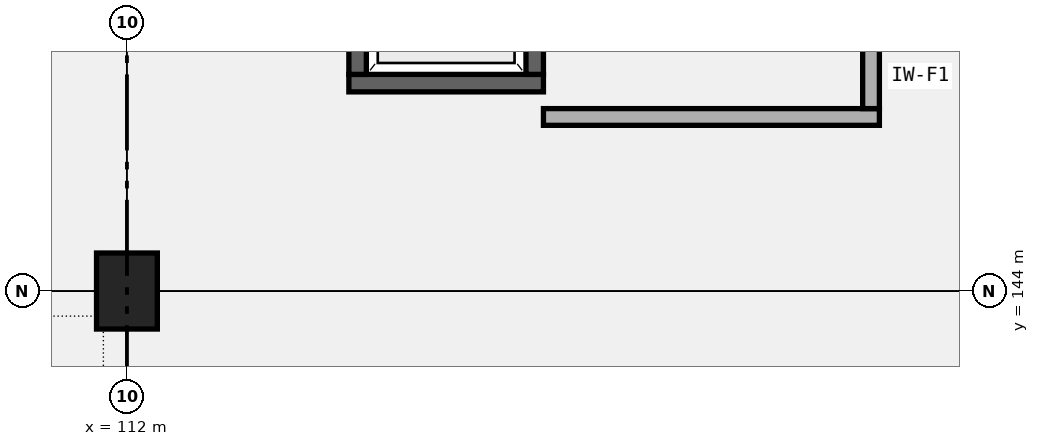
"""IFC4 building model, lengths in metres.
Left out: names, types, materials, properties, quantities, classifications, styles, units other than length and angle.
Written with IfcOpenShell. Run it as: python <this file> out.ifc"""

import sys

from ifc_helpers import new_model, si_unit, direction, frame, frame_2d, origin, origin_2d, place, context, subcontext, project, spatial, rectangle, extrude, element, save


model = new_model("IFC4")
c1 = context("Model", 3, precision=1e-05, world=origin(), true_north=direction((0.0, 1.0)))
c2 = subcontext(c1, "Body", "Model", "MODEL_VIEW")
j1 = project(units=[si_unit("LENGTHUNIT", "METRE"), si_unit("PLANEANGLEUNIT", "RADIAN")], contexts=[c1])
p1 = place(None, origin())
s1 = spatial("IfcSite", under=j1, at=p1, CompositionType="ELEMENT")
p2 = place(p1, origin())
s2 = spatial("IfcBuilding", under=s1, at=p2, CompositionType="ELEMENT")
p3 = place(p2, frame((0.0, 0.0, 10.2)))
s3 = spatial("IfcBuildingStorey", under=s2, at=p3, CompositionType="ELEMENT", Elevation=10.2)
p4 = place(p3, frame((112.0, 144.0, 0.0), z_axis=(0.0, 0.0, 1.0), x_axis=(1.0, 0.0, 0.0)))
e1 = element("IfcColumn", 1, at=p4, inside=s3, PredefinedType="COLUMN", context=c2, shape_type="SweptSolid", body=[
    extrude(rectangle(XDim=0.8, YDim=1.0, at=origin_2d()), origin(), (0.0, 0.0, 1.0), 5.1),
])
p5 = place(p3, frame((114.92, 146.735, 0.0), z_axis=(0.0, 0.0, 1.0), x_axis=(1.0, 0.0, 0.0)))
e2 = element("IfcWall", 2, at=p5, inside=s3, PredefinedType="SHEAR", context=c2, shape_type="SweptSolid", body=[
    extrude(rectangle(XDim=2.56, YDim=0.23, at=frame_2d((1.28, 0.0))), origin(), (0.0, 0.0, 1.0), 4.82),
])
p6 = place(p3, frame((115.035, 146.85, 0.0), z_axis=(0.0, 0.0, 1.0), x_axis=(0.0, 1.0, 0.0)))
e3 = element("IfcWall", 3, at=p6, inside=s3, PredefinedType="SHEAR", context=c2, shape_type="SweptSolid", body=[
    extrude(rectangle(XDim=2.7, YDim=0.23, at=frame_2d((1.35, 0.0))), origin(), (0.0, 0.0, 1.0), 4.82),
])
p7 = place(p3, frame((117.365, 146.85, 0.0), z_axis=(0.0, 0.0, 1.0), x_axis=(0.0, 1.0, 0.0)))
e4 = element("IfcWall", 4, at=p7, inside=s3, PredefinedType="SHEAR", context=c2, shape_type="SweptSolid", body=[
    extrude(rectangle(XDim=2.7, YDim=0.23, at=frame_2d((1.35, 0.0))), origin(), (0.0, 0.0, 1.0), 4.82),
])
p8 = place(p7, frame((0.8, 0.0, 0.0)))
e5 = element("IfcOpeningElement", 5, at=p8, cuts=e4, PredefinedType="OPENING", context=c2, shape_type="SweptSolid", body=[
    extrude(rectangle(XDim=1.1, YDim=2.15, at=frame_2d((0.55, 1.075))), frame((0.0, 0.125, 0.0), z_axis=(0.0, -1.0, 0.0), x_axis=(1.0, 0.0, 0.0)), (0.0, 0.0, 1.0), 0.25),
])
p9 = place(p3, frame((117.48, 146.29, 0.0), z_axis=(0.0, 0.0, 1.0), x_axis=(1.0, 0.0, 0.0)))
e6 = element("IfcWall", 6, at=p9, inside=s3, PredefinedType="SOLIDWALL", context=c2, shape_type="SweptSolid", body=[
    extrude(rectangle(XDim=4.42, YDim=0.22, at=frame_2d((2.21, 0.0))), origin(), (0.0, 0.0, 1.0), 4.22),
])
p10 = place(p3, frame((121.79, 146.4, 0.0), z_axis=(0.0, 0.0, 1.0), x_axis=(0.0, 1.0, 0.0)))
e7 = element("IfcWall", 7, at=p10, inside=s3, PredefinedType="SOLIDWALL", context=c2, shape_type="SweptSolid", body=[
    extrude(rectangle(XDim=3.6, YDim=0.22, at=frame_2d((1.8, 0.0))), origin(), (0.0, 0.0, 1.0), 4.22),
])
p11 = place(p10, frame((1.15, 0.0, 0.0)))
e8 = element("IfcOpeningElement", 8, at=p11, cuts=e7, PredefinedType="OPENING", context=c2, shape_type="SweptSolid", body=[
    extrude(rectangle(XDim=1.3, YDim=2.15, at=frame_2d((0.65, 1.075))), frame((0.0, 0.12, 0.0), z_axis=(0.0, -1.0, 0.0), x_axis=(1.0, 0.0, 0.0)), (0.0, 0.0, 1.0), 0.24),
])
save(model, sys.argv[1])
